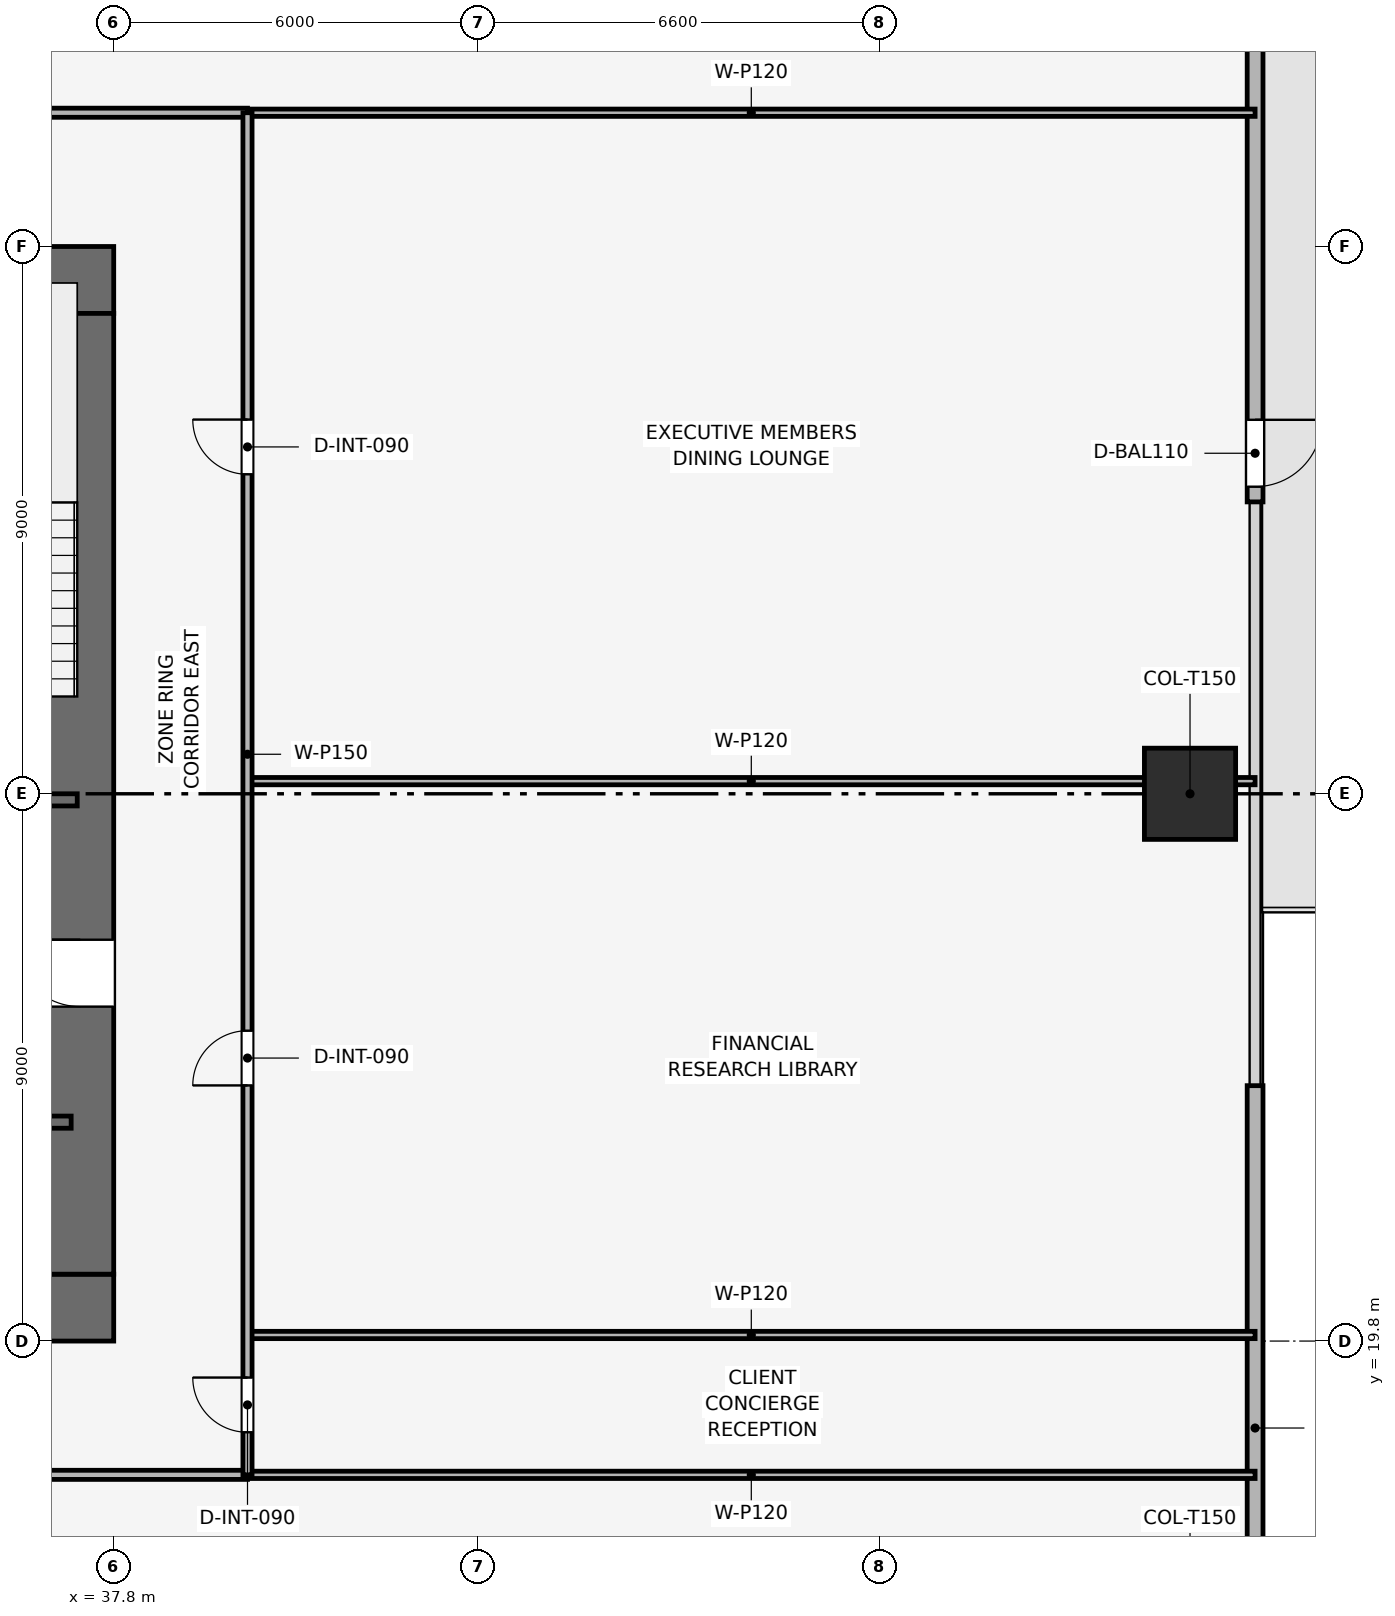
"""IFC4 building model, lengths in metres.
Left out: names, types, materials, properties, quantities, classifications, styles, units other than length and angle.
Written with IfcOpenShell. Run it as: python <this file> out.ifc"""

import sys

from ifc_helpers import new_model, si_unit, direction, frame, frame_2d, origin, origin_2d, place, context, subcontext, project, spatial, rectangle, extrude, element, fill, save


model = new_model("IFC4")
c1 = context("Model", 3, precision=1e-05, world=origin(), true_north=direction((0.0, 1.0)))
c2 = subcontext(c1, "Body", "Model", "MODEL_VIEW")
j1 = project(units=[si_unit("LENGTHUNIT", "METRE"), si_unit("PLANEANGLEUNIT", "RADIAN")], contexts=[c1])
p1 = place(None, origin())
s1 = spatial("IfcSite", under=j1, at=p1, CompositionType="ELEMENT")
p2 = place(p1, origin())
s2 = spatial("IfcBuilding", under=s1, at=p2, CompositionType="ELEMENT")
p3 = place(p2, frame((0.0, 0.0, 57.3)))
s3 = spatial("IfcBuildingStorey", under=s2, at=p3, CompositionType="ELEMENT", Elevation=57.3)
p4 = place(p3, frame((19.8, 20.35, 0.0), z_axis=(0.0, 0.0, 1.0), x_axis=(1.0, 0.0, 0.0)))
e1 = element("IfcWall", 1, at=p4, inside=s3, PredefinedType="SHEAR", context=c2, shape_type="SweptSolid", body=[
    extrude(rectangle(XDim=18.0, YDim=1.1, at=frame_2d((9.0, 0.0))), origin(), (0.0, 0.0, 1.0), 3.9),
])
p5 = place(p4, frame((8.4, 0.0, 0.0)))
e2 = element("IfcOpeningElement", 2, at=p5, cuts=e1, PredefinedType="OPENING", context=c2, shape_type="SweptSolid", body=[
    extrude(rectangle(XDim=1.2, YDim=2.2, at=frame_2d((0.6, 1.1))), frame((0.0, 0.56, 0.0), z_axis=(0.0, -1.0, 0.0), x_axis=(1.0, 0.0, 0.0)), (0.0, 0.0, 1.0), 1.12),
])
p6 = place(p3, frame((19.8, 37.25, 0.0), z_axis=(0.0, 0.0, 1.0), x_axis=(1.0, 0.0, 0.0)))
e3 = element("IfcWall", 3, at=p6, inside=s3, PredefinedType="SHEAR", context=c2, shape_type="SweptSolid", body=[
    extrude(rectangle(XDim=18.0, YDim=1.1, at=frame_2d((9.0, 0.0))), origin(), (0.0, 0.0, 1.0), 3.9),
])
p7 = place(p6, frame((7.05, 0.0, 0.0)))
e4 = element("IfcOpeningElement", 4, at=p7, cuts=e3, PredefinedType="OPENING", context=c2, shape_type="SweptSolid", body=[
    extrude(rectangle(XDim=1.1, YDim=2.15, at=frame_2d((0.55, 1.075))), frame((0.0, 0.56, 0.0), z_axis=(0.0, -1.0, 0.0), x_axis=(1.0, 0.0, 0.0)), (0.0, 0.0, 1.0), 1.12),
])
p8 = place(p3, frame((37.25, 20.9, 0.0), z_axis=(0.0, 0.0, 1.0), x_axis=(0.0, 1.0, 0.0)))
e5 = element("IfcWall", 5, at=p8, inside=s3, PredefinedType="SHEAR", context=c2, shape_type="SweptSolid", body=[
    extrude(rectangle(XDim=15.8, YDim=1.1, at=frame_2d((7.9, 0.0))), origin(), (0.0, 0.0, 1.0), 3.9),
])
p9 = place(p8, frame((4.4, 0.0, 0.0)))
e6 = element("IfcOpeningElement", 6, at=p9, cuts=e5, PredefinedType="OPENING", context=c2, shape_type="SweptSolid", body=[
    extrude(rectangle(XDim=1.1, YDim=2.15, at=frame_2d((0.55, 1.075))), frame((0.0, 0.56, 0.0), z_axis=(0.0, -1.0, 0.0), x_axis=(1.0, 0.0, 0.0)), (0.0, 0.0, 1.0), 1.12),
])
p10 = place(p3, frame((55.5, 28.8, 0.003), z_axis=(0.0, 0.0, 1.0), x_axis=(1.0, 0.0, 0.0)))
e7 = element("IfcColumn", 7, at=p10, inside=s3, PredefinedType="COLUMN", context=c2, shape_type="SweptSolid", body=[
    extrude(rectangle(XDim=1.5, YDim=1.5, at=origin_2d()), origin(), (0.0, 0.0, 1.0), 3.644),
])
p11 = place(p3, frame((56.57, 48.9, 0.0), z_axis=(0.0, 0.0, 1.0), x_axis=(0.0, -1.0, 0.0)))
e8 = element("IfcWall", 8, at=p11, inside=s3, PredefinedType="SOLIDWALL", context=c2, shape_type="SweptSolid", body=[
    extrude(rectangle(XDim=15.3, YDim=0.26, at=frame_2d((7.65, 0.0))), origin(), (0.0, 0.0, 1.0), 3.65),
])
p12 = place(p11, frame((13.95, 0.0, 0.0)))
e9 = element("IfcOpeningElement", 9, at=p12, cuts=e8, PredefinedType="OPENING", context=c2, shape_type="SweptSolid", body=[
    extrude(rectangle(XDim=1.1, YDim=2.2, at=frame_2d((0.55, 1.1))), frame((0.0, 0.14, 0.0), z_axis=(0.0, -1.0, 0.0), x_axis=(1.0, 0.0, 0.0)), (0.0, 0.0, 1.0), 0.28),
])
p13 = place(p3, frame((56.57, 24.0, 0.0), z_axis=(0.0, 0.0, 1.0), x_axis=(0.0, -1.0, 0.0)))
e10 = element("IfcWall", 10, at=p13, inside=s3, PredefinedType="SOLIDWALL", context=c2, shape_type="SweptSolid", body=[
    extrude(rectangle(XDim=15.3, YDim=0.26, at=frame_2d((7.65, 0.0))), origin(), (0.0, 0.0, 1.0), 3.65),
])
p14 = place(p13, frame((11.25, 0.0, 0.9)))
e11 = element("IfcOpeningElement", 11, at=p14, cuts=e10, PredefinedType="OPENING", context=c2, shape_type="SweptSolid", body=[
    extrude(rectangle(XDim=3.8, YDim=1.9, at=frame_2d((1.9, 0.95))), frame((0.0, 0.14, 0.0), z_axis=(0.0, -1.0, 0.0), x_axis=(1.0, 0.0, 0.0)), (0.0, 0.0, 1.0), 0.28),
])
p15 = place(p3, frame((34.05, 28.7, 0.0), z_axis=(0.0, 0.0, 1.0), x_axis=(1.0, 0.0, 0.0)))
e12 = element("IfcWall", 12, at=p15, inside=s3, PredefinedType="SHEAR", context=c2, shape_type="SweptSolid", body=[
    extrude(rectangle(XDim=3.15, YDim=0.2, at=frame_2d((1.575, 0.0))), origin(), (0.0, 0.0, 1.0), 3.65),
])
p16 = place(p15, frame((0.8, 0.0, 0.0)))
e13 = element("IfcOpeningElement", 13, at=p16, cuts=e12, PredefinedType="OPENING", context=c2, shape_type="SweptSolid", body=[
    extrude(rectangle(XDim=1.0, YDim=2.1, at=frame_2d((0.5, 1.05))), frame((0.0, 0.11, 0.0), z_axis=(0.0, -1.0, 0.0), x_axis=(1.0, 0.0, 0.0)), (0.0, 0.0, 1.0), 0.22),
])
p17 = place(p3, frame((34.05, 23.4, 0.0), z_axis=(0.0, 0.0, 1.0), x_axis=(1.0, 0.0, 0.0)))
e14 = element("IfcWall", 14, at=p17, inside=s3, PredefinedType="SHEAR", context=c2, shape_type="SweptSolid", body=[
    extrude(rectangle(XDim=3.05, YDim=0.2, at=frame_2d((1.525, 0.0))), origin(), (0.0, 0.0, 1.0), 3.65),
])
p18 = place(p17, frame((1.2, 0.0, 0.0)))
e15 = element("IfcOpeningElement", 15, at=p18, cuts=e14, PredefinedType="OPENING", context=c2, shape_type="SweptSolid", body=[
    extrude(rectangle(XDim=1.1, YDim=2.15, at=frame_2d((0.55, 1.075))), frame((0.0, 0.11, 0.0), z_axis=(0.0, -1.0, 0.0), x_axis=(1.0, 0.0, 0.0)), (0.0, 0.0, 1.0), 0.22),
])
for number, where, z_axis, x_axis in (
    (16, (40.0, 17.6, 0.0), (0.0, 0.0, 1.0), (1.0, 0.0, 0.0)),
    (17, (40.0, 40.0, 0.0), (0.0, 0.0, 1.0), (1.0, 0.0, 0.0)),
    (18, (40.0, 19.9, 0.0), (0.0, 0.0, 1.0), (1.0, 0.0, 0.0)),
    (19, (40.0, 29.008, 0.0), (0.0, 0.0, 1.0), (1.0, 0.0, 0.0)),
):
    element("IfcWall", number, at=place(p3, frame(where, z_axis=z_axis, x_axis=x_axis)), inside=s3, PredefinedType="PARTITIONING", context=c2, shape_type="SweptSolid", body=[
        extrude(rectangle(XDim=16.57, YDim=0.12, at=frame_2d((8.285, 0.0))), origin(), (0.0, 0.0, 1.0), 2.935),
    ])
p19 = place(p3, frame((17.6, 17.6, 0.0), z_axis=(0.0, 0.0, 1.0), x_axis=(1.0, 0.0, 0.0)))
e20 = element("IfcWall", 20, at=p19, inside=s3, PredefinedType="PARTITIONING", context=c2, shape_type="SweptSolid", body=[
    extrude(rectangle(XDim=22.4, YDim=0.15, at=frame_2d((11.2, 0.0))), origin(), (0.0, 0.0, 1.0), 3.085),
])
p20 = place(p19, frame((10.75, 0.0, 0.0)))
e21 = element("IfcOpeningElement", 21, at=p20, cuts=e20, PredefinedType="OPENING", context=c2, shape_type="SweptSolid", body=[
    extrude(rectangle(XDim=0.9, YDim=2.1, at=frame_2d((0.45, 1.05))), frame((0.0, 0.085, 0.0), z_axis=(0.0, -1.0, 0.0), x_axis=(1.0, 0.0, 0.0)), (0.0, 0.0, 1.0), 0.17),
])
p21 = place(p3, frame((17.6, 40.0, 0.0), z_axis=(0.0, 0.0, 1.0), x_axis=(1.0, 0.0, 0.0)))
e22 = element("IfcWall", 22, at=p21, inside=s3, PredefinedType="PARTITIONING", context=c2, shape_type="SweptSolid", body=[
    extrude(rectangle(XDim=22.4, YDim=0.15, at=frame_2d((11.2, 0.0))), origin(), (0.0, 0.0, 1.0), 3.085),
])
p22 = place(p21, frame((4.349, 0.0, 0.0)))
e23 = element("IfcOpeningElement", 23, at=p22, cuts=e22, PredefinedType="OPENING", context=c2, shape_type="SweptSolid", body=[
    extrude(rectangle(XDim=0.9, YDim=2.1, at=frame_2d((0.45, 1.05))), frame((0.0, 0.085, 0.0), z_axis=(0.0, -1.0, 0.0), x_axis=(1.0, 0.0, 0.0)), (0.0, 0.0, 1.0), 0.17),
])
p23 = place(p21, frame((15.549, 0.0, 0.0)))
e24 = element("IfcOpeningElement", 24, at=p23, cuts=e22, PredefinedType="OPENING", context=c2, shape_type="SweptSolid", body=[
    extrude(rectangle(XDim=0.9, YDim=2.1, at=frame_2d((0.45, 1.05))), frame((0.0, 0.085, 0.0), z_axis=(0.0, -1.0, 0.0), x_axis=(1.0, 0.0, 0.0)), (0.0, 0.0, 1.0), 0.17),
])
p24 = place(p3, frame((40.0, 17.6, 0.0), z_axis=(0.0, 0.0, 1.0), x_axis=(0.0, 1.0, 0.0)))
e25 = element("IfcWall", 25, at=p24, inside=s3, PredefinedType="PARTITIONING", context=c2, shape_type="SweptSolid", body=[
    extrude(rectangle(XDim=22.4, YDim=0.15, at=frame_2d((11.2, 0.0))), origin(), (0.0, 0.0, 1.0), 3.085),
])
p25 = place(p24, frame((0.7, 0.0, 0.0)))
e26 = element("IfcOpeningElement", 26, at=p25, cuts=e25, PredefinedType="OPENING", context=c2, shape_type="SweptSolid", body=[
    extrude(rectangle(XDim=0.9, YDim=2.1, at=frame_2d((0.45, 1.05))), frame((0.0, 0.085, 0.0), z_axis=(0.0, -1.0, 0.0), x_axis=(1.0, 0.0, 0.0)), (0.0, 0.0, 1.0), 0.17),
])
p26 = place(p24, frame((6.404, 0.0, 0.0)))
e27 = element("IfcOpeningElement", 27, at=p26, cuts=e25, PredefinedType="OPENING", context=c2, shape_type="SweptSolid", body=[
    extrude(rectangle(XDim=0.9, YDim=2.1, at=frame_2d((0.45, 1.05))), frame((0.0, 0.085, 0.0), z_axis=(0.0, -1.0, 0.0), x_axis=(1.0, 0.0, 0.0)), (0.0, 0.0, 1.0), 0.17),
])
p27 = place(p24, frame((16.454, 0.0, 0.0)))
e28 = element("IfcOpeningElement", 28, at=p27, cuts=e25, PredefinedType="OPENING", context=c2, shape_type="SweptSolid", body=[
    extrude(rectangle(XDim=0.9, YDim=2.1, at=frame_2d((0.45, 1.05))), frame((0.0, 0.085, 0.0), z_axis=(0.0, -1.0, 0.0), x_axis=(1.0, 0.0, 0.0)), (0.0, 0.0, 1.0), 0.17),
])
p28 = place(p12, origin())
e29 = element("IfcDoor", 29, at=p28, inside=s3, OperationType="SINGLE_SWING_LEFT", PredefinedType="DOOR", context=c2, shape_type="SweptSolid", body=[
    extrude(rectangle(XDim=1.1, YDim=2.2, at=frame_2d((0.55, 1.1))), frame((0.0, 0.025, 0.0), z_axis=(0.0, -1.0, 0.0), x_axis=(1.0, 0.0, 0.0)), (0.0, 0.0, 1.0), 0.05),
])
fill(e9, e29)
p29 = place(p25, origin())
e30 = element("IfcDoor", 30, at=p29, inside=s3, OperationType="SINGLE_SWING_RIGHT", PredefinedType="DOOR", context=c2, shape_type="SweptSolid", body=[
    extrude(rectangle(XDim=0.9, YDim=2.1, at=frame_2d((0.45, 1.05))), frame((0.0, 0.025, 0.0), z_axis=(0.0, -1.0, 0.0), x_axis=(1.0, 0.0, 0.0)), (0.0, 0.0, 1.0), 0.05),
])
fill(e26, e30)
p30 = place(p26, origin())
e31 = element("IfcDoor", 31, at=p30, inside=s3, OperationType="SINGLE_SWING_LEFT", PredefinedType="DOOR", context=c2, shape_type="SweptSolid", body=[
    extrude(rectangle(XDim=0.9, YDim=2.1, at=frame_2d((0.45, 1.05))), frame((0.0, 0.025, 0.0), z_axis=(0.0, -1.0, 0.0), x_axis=(1.0, 0.0, 0.0)), (0.0, 0.0, 1.0), 0.05),
])
fill(e27, e31)
p31 = place(p27, origin())
e32 = element("IfcDoor", 32, at=p31, inside=s3, OperationType="SINGLE_SWING_RIGHT", PredefinedType="DOOR", context=c2, shape_type="SweptSolid", body=[
    extrude(rectangle(XDim=0.9, YDim=2.1, at=frame_2d((0.45, 1.05))), frame((0.0, 0.025, 0.0), z_axis=(0.0, -1.0, 0.0), x_axis=(1.0, 0.0, 0.0)), (0.0, 0.0, 1.0), 0.05),
])
fill(e28, e32)
p32 = place(p9, origin())
e33 = element("IfcDoor", 33, at=p32, inside=s3, OperationType="SINGLE_SWING_RIGHT", PredefinedType="DOOR", context=c2, shape_type="SweptSolid", body=[
    extrude(rectangle(XDim=1.1, YDim=2.15, at=frame_2d((0.55, 1.075))), frame((0.0, 0.025, 0.0), z_axis=(0.0, -1.0, 0.0), x_axis=(1.0, 0.0, 0.0)), (0.0, 0.0, 1.0), 0.05),
])
fill(e6, e33)
save(model, sys.argv[1])
